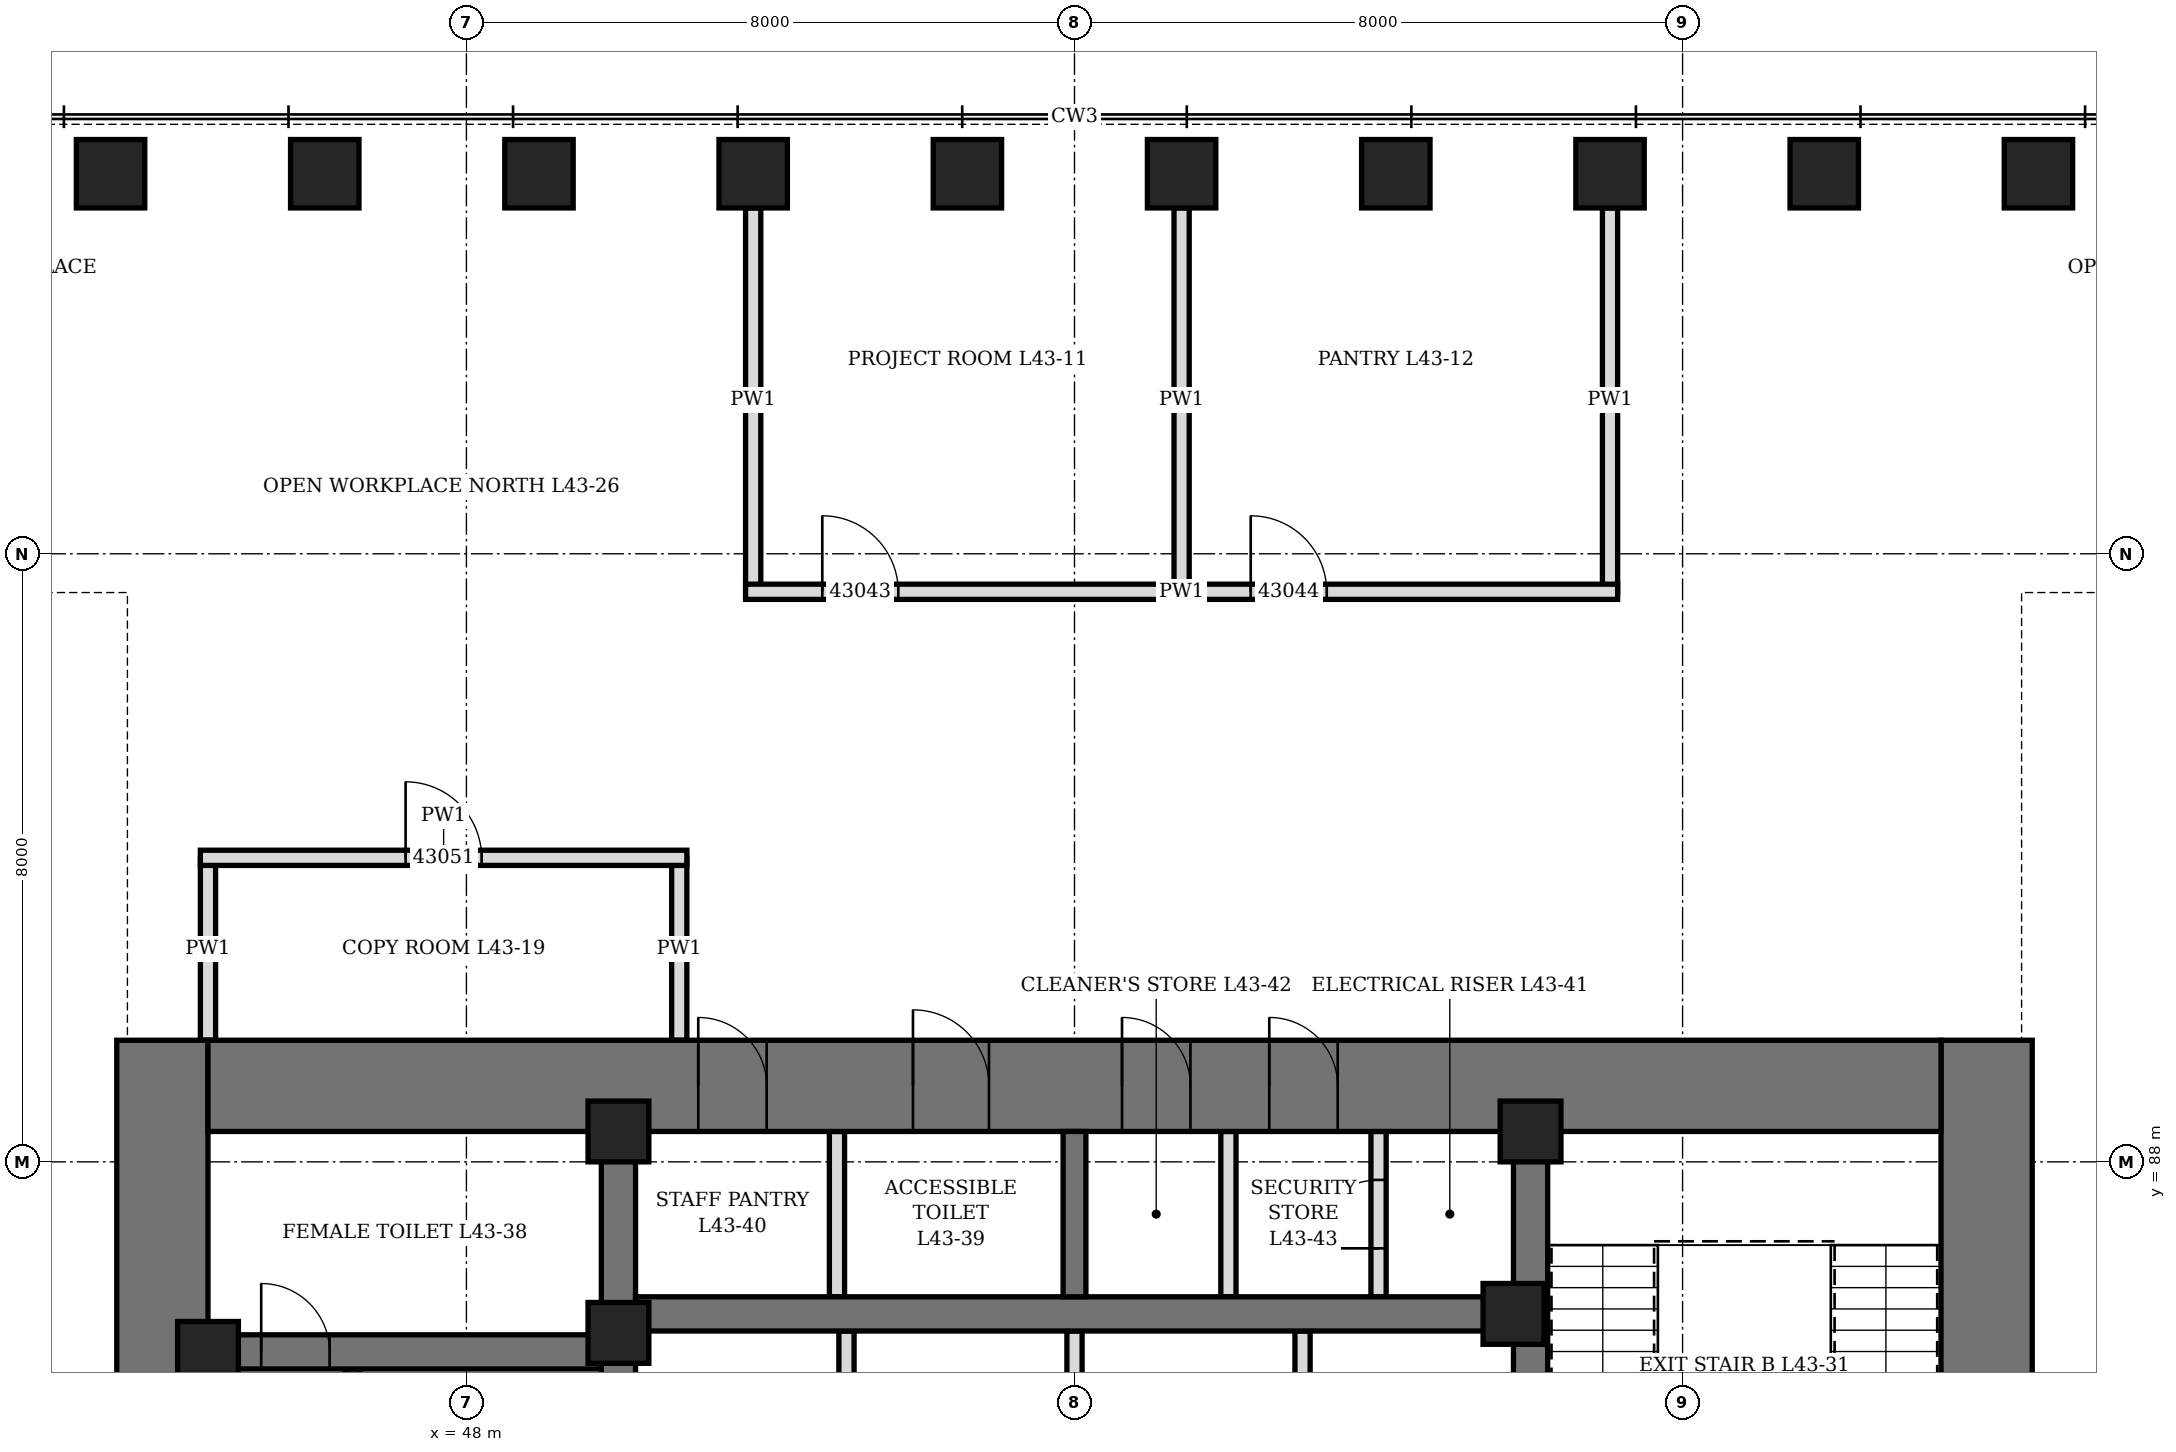
"""IFC4 building model, lengths in metres.
Left out: names, types, materials, properties, quantities, classifications, styles, units other than length and angle.
Written with IfcOpenShell. Run it as: python <this file> out.ifc"""

import sys

from ifc_helpers import new_model, si_unit, direction, frame, frame_2d, origin, origin_2d, place, context, subcontext, project, spatial, rectangle, hollow_rectangle, extrude, element, fill, save


model = new_model("IFC4")
c1 = context("Model", 3, precision=1e-05, world=origin(), true_north=direction((0.0, 1.0)))
c2 = subcontext(c1, "Body", "Model", "MODEL_VIEW")
j1 = project(units=[si_unit("LENGTHUNIT", "METRE"), si_unit("PLANEANGLEUNIT", "RADIAN")], contexts=[c1])
p1 = place(None, origin())
s1 = spatial("IfcSite", under=j1, at=p1, CompositionType="ELEMENT")
p2 = place(p1, origin())
s2 = spatial("IfcBuilding", under=s1, at=p2, CompositionType="ELEMENT")
p3 = place(p2, frame((0.0, 0.0, 193.9)))
s3 = spatial("IfcBuildingStorey", under=s2, at=p3, CompositionType="ELEMENT", Elevation=193.9)
for number, where, z_axis, x_axis in (
    (1, (68.682, 101.0, 0.0), (0.0, 0.0, 1.0), (1.0, 0.0, 0.0)),
    (2, (65.864, 101.0, 0.0), (0.0, 0.0, 1.0), (1.0, 0.0, 0.0)),
    (3, (63.045, 101.0, 0.0), (0.0, 0.0, 1.0), (1.0, 0.0, 0.0)),
    (4, (60.227, 101.0, 0.0), (0.0, 0.0, 1.0), (1.0, 0.0, 0.0)),
    (5, (57.409, 101.0, 0.0), (0.0, 0.0, 1.0), (1.0, 0.0, 0.0)),
    (6, (54.591, 101.0, 0.0), (0.0, 0.0, 1.0), (1.0, 0.0, 0.0)),
    (7, (51.773, 101.0, 0.0), (0.0, 0.0, 1.0), (1.0, 0.0, 0.0)),
    (8, (48.955, 101.0, 0.0), (0.0, 0.0, 1.0), (1.0, 0.0, 0.0)),
    (9, (46.136, 101.0, 0.0), (0.0, 0.0, 1.0), (1.0, 0.0, 0.0)),
    (10, (43.318, 101.0, 0.0), (0.0, 0.0, 1.0), (1.0, 0.0, 0.0)),
):
    element("IfcColumn", number, at=place(p3, frame(where, z_axis=z_axis, x_axis=x_axis)), inside=s3, PredefinedType="COLUMN", context=c2, shape_type="SweptSolid", body=[
        extrude(hollow_rectangle(XDim=0.9, YDim=0.9, WallThickness=0.12, at=origin_2d()), origin(), (0.0, 0.0, 1.0), 4.2),
    ])
p4 = place(p3, frame((44.0, 70.4, 0.0), z_axis=(0.0, 0.0, 1.0), x_axis=(0.0, 1.0, 0.0)))
e11 = element("IfcWall", 11, at=p4, inside=s3, PredefinedType="SHEAR", context=c2, shape_type="SweptSolid", body=[
    extrude(rectangle(XDim=19.2, YDim=1.2, at=frame_2d((9.6, 0.0))), origin(), (0.0, 0.0, 1.0), 4.2),
])
p5 = place(p4, frame((8.6, 0.0, 0.0)))
e12 = element("IfcOpeningElement", 12, at=p5, cuts=e11, PredefinedType="OPENING", context=c2, shape_type="SweptSolid", body=[
    extrude(rectangle(XDim=2.0, YDim=2.4, at=frame_2d((1.0, 1.2))), frame((0.0, 0.61, 0.0), z_axis=(0.0, -1.0, 0.0), x_axis=(1.0, 0.0, 0.0)), (0.0, 0.0, 1.0), 1.22),
])
p6 = place(p3, frame((68.0, 70.4, 0.0), z_axis=(0.0, 0.0, 1.0), x_axis=(0.0, 1.0, 0.0)))
e13 = element("IfcWall", 13, at=p6, inside=s3, PredefinedType="SHEAR", context=c2, shape_type="SweptSolid", body=[
    extrude(rectangle(XDim=19.2, YDim=1.2, at=frame_2d((9.6, 0.0))), origin(), (0.0, 0.0, 1.0), 4.2),
])
p7 = place(p6, frame((8.6, 0.0, 0.0)))
e14 = element("IfcOpeningElement", 14, at=p7, cuts=e13, PredefinedType="OPENING", context=c2, shape_type="SweptSolid", body=[
    extrude(rectangle(XDim=2.0, YDim=2.4, at=frame_2d((1.0, 1.2))), frame((0.0, 0.61, 0.0), z_axis=(0.0, -1.0, 0.0), x_axis=(1.0, 0.0, 0.0)), (0.0, 0.0, 1.0), 1.22),
])
p8 = place(p3, frame((44.6, 89.0, 0.0), z_axis=(0.0, 0.0, 1.0), x_axis=(1.0, 0.0, 0.0)))
e15 = element("IfcWall", 15, at=p8, inside=s3, PredefinedType="SHEAR", context=c2, shape_type="SweptSolid", body=[
    extrude(rectangle(XDim=22.8, YDim=1.2, at=frame_2d((11.4, 0.0))), origin(), (0.0, 0.0, 1.0), 4.2),
])
p9 = place(p8, frame((9.275, 0.0, 0.0)))
e16 = element("IfcOpeningElement", 16, at=p9, cuts=e15, PredefinedType="OPENING", context=c2, shape_type="SweptSolid", body=[
    extrude(rectangle(XDim=1.0, YDim=2.1, at=frame_2d((0.5, 1.05))), frame((0.0, 0.61, 0.0), z_axis=(0.0, -1.0, 0.0), x_axis=(1.0, 0.0, 0.0)), (0.0, 0.0, 1.0), 1.22),
])
p10 = place(p8, frame((6.45, 0.0, 0.0)))
e17 = element("IfcOpeningElement", 17, at=p10, cuts=e15, PredefinedType="OPENING", context=c2, shape_type="SweptSolid", body=[
    extrude(rectangle(XDim=0.9, YDim=2.1, at=frame_2d((0.45, 1.05))), frame((0.0, 0.61, 0.0), z_axis=(0.0, -1.0, 0.0), x_axis=(1.0, 0.0, 0.0)), (0.0, 0.0, 1.0), 1.22),
])
p11 = place(p8, frame((12.025, 0.0, 0.0)))
e18 = element("IfcOpeningElement", 18, at=p11, cuts=e15, PredefinedType="OPENING", context=c2, shape_type="SweptSolid", body=[
    extrude(rectangle(XDim=0.9, YDim=2.1, at=frame_2d((0.45, 1.05))), frame((0.0, 0.61, 0.0), z_axis=(0.0, -1.0, 0.0), x_axis=(1.0, 0.0, 0.0)), (0.0, 0.0, 1.0), 1.22),
])
p12 = place(p8, frame((13.962, 0.0, 0.0)))
e19 = element("IfcOpeningElement", 19, at=p12, cuts=e15, PredefinedType="OPENING", context=c2, shape_type="SweptSolid", body=[
    extrude(rectangle(XDim=0.9, YDim=2.1, at=frame_2d((0.45, 1.05))), frame((0.0, 0.61, 0.0), z_axis=(0.0, -1.0, 0.0), x_axis=(1.0, 0.0, 0.0)), (0.0, 0.0, 1.0), 1.22),
])
p13 = place(p3, frame((50.0, 71.6, 0.0), z_axis=(0.0, 0.0, 1.0), x_axis=(0.0, 1.0, 0.0)))
e20 = element("IfcWall", 20, at=p13, inside=s3, PredefinedType="SHEAR", context=c2, shape_type="SweptSolid", body=[
    extrude(rectangle(XDim=16.8, YDim=0.45, at=frame_2d((8.4, 0.0))), origin(), (0.0, 0.0, 1.0), 4.2),
])
p14 = place(p13, frame((7.5, 0.0, 0.0)))
e21 = element("IfcOpeningElement", 21, at=p14, cuts=e20, PredefinedType="OPENING", context=c2, shape_type="SweptSolid", body=[
    extrude(rectangle(XDim=1.8, YDim=2.4, at=frame_2d((0.9, 1.2))), frame((0.0, 0.235, 0.0), z_axis=(0.0, -1.0, 0.0), x_axis=(1.0, 0.0, 0.0)), (0.0, 0.0, 1.0), 0.47),
])
p15 = place(p3, frame((62.0, 71.6, 0.0), z_axis=(0.0, 0.0, 1.0), x_axis=(0.0, 1.0, 0.0)))
e22 = element("IfcWall", 22, at=p15, inside=s3, PredefinedType="SHEAR", context=c2, shape_type="SweptSolid", body=[
    extrude(rectangle(XDim=16.8, YDim=0.45, at=frame_2d((8.4, 0.0))), origin(), (0.0, 0.0, 1.0), 4.2),
])
p16 = place(p15, frame((7.5, 0.0, 0.0)))
e23 = element("IfcOpeningElement", 23, at=p16, cuts=e22, PredefinedType="OPENING", context=c2, shape_type="SweptSolid", body=[
    extrude(rectangle(XDim=1.8, YDim=2.4, at=frame_2d((0.9, 1.2))), frame((0.0, 0.235, 0.0), z_axis=(0.0, -1.0, 0.0), x_axis=(1.0, 0.0, 0.0)), (0.0, 0.0, 1.0), 0.47),
])
p17 = place(p3, frame((44.6, 85.5, 0.0), z_axis=(0.0, 0.0, 1.0), x_axis=(1.0, 0.0, 0.0)))
e24 = element("IfcWall", 24, at=p17, inside=s3, PredefinedType="SHEAR", context=c2, shape_type="SweptSolid", body=[
    extrude(rectangle(XDim=5.175, YDim=0.45, at=frame_2d((2.587, 0.0))), origin(), (0.0, 0.0, 1.0), 4.2),
])
p18 = place(p17, frame((0.7, 0.0, 0.0)))
e25 = element("IfcOpeningElement", 25, at=p18, cuts=e24, PredefinedType="OPENING", context=c2, shape_type="SweptSolid", body=[
    extrude(rectangle(XDim=0.9, YDim=2.1, at=frame_2d((0.45, 1.05))), frame((0.0, 0.235, 0.0), z_axis=(0.0, -1.0, 0.0), x_axis=(1.0, 0.0, 0.0)), (0.0, 0.0, 1.0), 0.47),
])
p19 = place(p3, frame((50.225, 86.0, 0.0), z_axis=(0.0, 0.0, 1.0), x_axis=(1.0, 0.0, 0.0)))
e26 = element("IfcWall", 26, at=p19, inside=s3, PredefinedType="SHEAR", context=c2, shape_type="SweptSolid", body=[
    extrude(rectangle(XDim=11.55, YDim=0.45, at=frame_2d((5.775, 0.0))), origin(), (0.0, 0.0, 1.0), 4.2),
])
p20 = place(p3, frame((56.0, 86.225, 0.0), z_axis=(0.0, 0.0, 1.0), x_axis=(0.0, 1.0, 0.0)))
e27 = element("IfcWall", 27, at=p20, inside=s3, PredefinedType="SHEAR", context=c2, shape_type="SweptSolid", body=[
    extrude(rectangle(XDim=2.175, YDim=0.3, at=frame_2d((1.087, 0.0))), origin(), (0.0, 0.0, 1.0), 4.2),
])
for number, where, z_axis, x_axis in (
    (28, (44.6, 85.5, 0.0), (0.0, 0.0, 1.0), (1.0, 0.0, 0.0)),
    (29, (50.0, 85.75, 0.0), (0.0, 0.0, 1.0), (1.0, 0.0, 0.0)),
    (30, (50.0, 88.4, 0.0), (0.0, 0.0, 1.0), (1.0, 0.0, 0.0)),
    (31, (61.775, 86.0, 0.0), (0.0, 0.0, 1.0), (1.0, 0.0, 0.0)),
    (32, (62.0, 88.4, 0.0), (0.0, 0.0, 1.0), (1.0, 0.0, 0.0)),
):
    element("IfcColumn", number, at=place(p3, frame(where, z_axis=z_axis, x_axis=x_axis)), inside=s3, PredefinedType="COLUMN", context=c2, shape_type="SweptSolid", body=[
        extrude(hollow_rectangle(XDim=0.8, YDim=0.8, WallThickness=0.1, at=origin_2d()), origin(), (0.0, 0.0, 1.0), 4.2),
    ])
p21 = place(p3, frame((46.5, 82.225, 0.0), z_axis=(0.0, 0.0, 1.0), x_axis=(0.0, 1.0, 0.0)))
e33 = element("IfcWall", 33, at=p21, inside=s3, PredefinedType="PARTITIONING", context=c2, shape_type="SweptSolid", body=[
    extrude(rectangle(XDim=3.05, YDim=0.2, at=frame_2d((1.525, 0.0))), origin(), (0.0, 0.0, 1.0), 4.04),
])
p22 = place(p21, frame((1.075, 0.0, 0.0)))
e34 = element("IfcOpeningElement", 34, at=p22, cuts=e33, PredefinedType="OPENING", context=c2, shape_type="SweptSolid", body=[
    extrude(rectangle(XDim=0.9, YDim=2.1, at=frame_2d((0.45, 1.05))), frame((0.0, 0.11, 0.0), z_axis=(0.0, -1.0, 0.0), x_axis=(1.0, 0.0, 0.0)), (0.0, 0.0, 1.0), 0.22),
])
p23 = place(p3, frame((52.875, 86.225, 0.0), z_axis=(0.0, 0.0, 1.0), x_axis=(0.0, 1.0, 0.0)))
e35 = element("IfcWall", 35, at=p23, inside=s3, PredefinedType="PARTITIONING", context=c2, shape_type="SweptSolid", body=[
    extrude(rectangle(XDim=2.175, YDim=0.2, at=frame_2d((1.087, 0.0))), origin(), (0.0, 0.0, 1.0), 4.04),
])
p24 = place(p3, frame((60.0, 86.225, 0.0), z_axis=(0.0, 0.0, 1.0), x_axis=(0.0, 1.0, 0.0)))
e36 = element("IfcWall", 36, at=p24, inside=s3, PredefinedType="PARTITIONING", context=c2, shape_type="SweptSolid", body=[
    extrude(rectangle(XDim=2.175, YDim=0.2, at=frame_2d((1.087, 0.0))), origin(), (0.0, 0.0, 1.0), 4.04),
])
p25 = place(p24, frame((0.637, 0.0, 0.0)))
e37 = element("IfcOpeningElement", 37, at=p25, cuts=e36, PredefinedType="OPENING", context=c2, shape_type="SweptSolid", body=[
    extrude(rectangle(XDim=0.9, YDim=2.1, at=frame_2d((0.45, 1.05))), frame((0.0, 0.11, 0.0), z_axis=(0.0, -1.0, 0.0), x_axis=(1.0, 0.0, 0.0)), (0.0, 0.0, 1.0), 0.22),
])
p26 = place(p3, frame((58.025, 86.225, 0.0), z_axis=(0.0, 0.0, 1.0), x_axis=(0.0, 1.0, 0.0)))
e38 = element("IfcWall", 38, at=p26, inside=s3, PredefinedType="PARTITIONING", context=c2, shape_type="SweptSolid", body=[
    extrude(rectangle(XDim=2.175, YDim=0.2, at=frame_2d((1.087, 0.0))), origin(), (0.0, 0.0, 1.0), 4.04),
])
p27 = place(p3, frame((53.0, 82.225, 0.0), z_axis=(0.0, 0.0, 1.0), x_axis=(0.0, 1.0, 0.0)))
e39 = element("IfcWall", 39, at=p27, inside=s3, PredefinedType="PARTITIONING", context=c2, shape_type="SweptSolid", body=[
    extrude(rectangle(XDim=3.55, YDim=0.2, at=frame_2d((1.775, 0.0))), origin(), (0.0, 0.0, 1.0), 4.04),
])
p28 = place(p3, frame((56.0, 82.225, 0.0), z_axis=(0.0, 0.0, 1.0), x_axis=(0.0, 1.0, 0.0)))
e40 = element("IfcWall", 40, at=p28, inside=s3, PredefinedType="PARTITIONING", context=c2, shape_type="SweptSolid", body=[
    extrude(rectangle(XDim=3.55, YDim=0.2, at=frame_2d((1.775, 0.0))), origin(), (0.0, 0.0, 1.0), 3.14),
])
p29 = place(p3, frame((59.0, 82.225, 0.0), z_axis=(0.0, 0.0, 1.0), x_axis=(0.0, 1.0, 0.0)))
e41 = element("IfcWall", 41, at=p29, inside=s3, PredefinedType="PARTITIONING", context=c2, shape_type="SweptSolid", body=[
    extrude(rectangle(XDim=3.55, YDim=0.2, at=frame_2d((1.775, 0.0))), origin(), (0.0, 0.0, 1.0), 4.04),
])
for number, where, z_axis, x_axis in (
    (42, (51.773, 95.5, 0.0), (0.0, 0.0, 1.0), (0.0, 1.0, 0.0)),
    (43, (57.409, 95.5, 0.0), (0.0, 0.0, 1.0), (0.0, 1.0, 0.0)),
    (44, (63.045, 95.5, 0.0), (0.0, 0.0, 1.0), (0.0, 1.0, 0.0)),
):
    element("IfcWall", number, at=place(p3, frame(where, z_axis=z_axis, x_axis=x_axis)), inside=s3, PredefinedType="PARTITIONING", context=c2, shape_type="SweptSolid", body=[
        extrude(rectangle(XDim=5.05, YDim=0.2, at=frame_2d((2.525, 0.0))), origin(), (0.0, 0.0, 1.0), 3.428),
    ])
for number, where, z_axis, x_axis in (
    (45, (44.6, 89.6, 0.0), (0.0, 0.0, 1.0), (0.0, 1.0, 0.0)),
    (46, (50.8, 89.6, 0.0), (0.0, 0.0, 1.0), (0.0, 1.0, 0.0)),
):
    element("IfcWall", number, at=place(p3, frame(where, z_axis=z_axis, x_axis=x_axis)), inside=s3, PredefinedType="PARTITIONING", context=c2, shape_type="SweptSolid", body=[
        extrude(rectangle(XDim=2.4, YDim=0.2, at=frame_2d((1.2, 0.0))), origin(), (0.0, 0.0, 1.0), 4.04),
    ])
p30 = place(p3, frame((44.5, 92.0, 0.0), z_axis=(0.0, 0.0, 1.0), x_axis=(1.0, 0.0, 0.0)))
e47 = element("IfcWall", 47, at=p30, inside=s3, PredefinedType="PARTITIONING", context=c2, shape_type="SweptSolid", body=[
    extrude(rectangle(XDim=6.4, YDim=0.2, at=frame_2d((3.2, 0.0))), origin(), (0.0, 0.0, 1.0), 4.04),
])
p31 = place(p30, frame((2.7, 0.0, 0.0)))
e48 = element("IfcOpeningElement", 48, at=p31, cuts=e47, PredefinedType="OPENING", context=c2, shape_type="SweptSolid", body=[
    extrude(rectangle(XDim=1.0, YDim=2.1, at=frame_2d((0.5, 1.05))), frame((0.0, 0.11, 0.0), z_axis=(0.0, -1.0, 0.0), x_axis=(1.0, 0.0, 0.0)), (0.0, 0.0, 1.0), 0.22),
])
p32 = place(p3, frame((51.673, 95.5, 0.0), z_axis=(0.0, 0.0, 1.0), x_axis=(1.0, 0.0, 0.0)))
e49 = element("IfcWall", 49, at=p32, inside=s3, PredefinedType="PARTITIONING", context=c2, shape_type="SweptSolid", body=[
    extrude(rectangle(XDim=11.473, YDim=0.2, at=frame_2d((5.736, 0.0))), origin(), (0.0, 0.0, 1.0), 4.04),
])
p33 = place(p32, frame((1.009, 0.0, 0.0)))
e50 = element("IfcOpeningElement", 50, at=p33, cuts=e49, PredefinedType="OPENING", context=c2, shape_type="SweptSolid", body=[
    extrude(rectangle(XDim=1.0, YDim=2.1, at=frame_2d((0.5, 1.05))), frame((0.0, 0.11, 0.0), z_axis=(0.0, -1.0, 0.0), x_axis=(1.0, 0.0, 0.0)), (0.0, 0.0, 1.0), 0.22),
])
p34 = place(p32, frame((6.646, 0.0, 0.0)))
e51 = element("IfcOpeningElement", 51, at=p34, cuts=e49, PredefinedType="OPENING", context=c2, shape_type="SweptSolid", body=[
    extrude(rectangle(XDim=1.0, YDim=2.1, at=frame_2d((0.5, 1.05))), frame((0.0, 0.11, 0.0), z_axis=(0.0, -1.0, 0.0), x_axis=(1.0, 0.0, 0.0)), (0.0, 0.0, 1.0), 0.22),
])
p35 = place(p18, origin())
e52 = element("IfcDoor", 52, at=p35, inside=s3, OperationType="SINGLE_SWING_RIGHT", PredefinedType="DOOR", context=c2, shape_type="SweptSolid", body=[
    extrude(rectangle(XDim=0.9, YDim=2.1, at=frame_2d((0.45, 1.05))), frame((0.0, 0.225, 0.0), z_axis=(0.0, -1.0, 0.0), x_axis=(1.0, 0.0, 0.0)), (0.0, 0.0, 1.0), 0.449),
])
fill(e25, e52)
p36 = place(p9, origin())
e53 = element("IfcDoor", 53, at=p36, inside=s3, OperationType="SINGLE_SWING_LEFT", PredefinedType="DOOR", context=c2, shape_type="SweptSolid", body=[
    extrude(rectangle(XDim=1.0, YDim=2.1, at=frame_2d((0.5, 1.05))), frame((0.0, 0.35, 0.0), z_axis=(0.0, -1.0, 0.0), x_axis=(1.0, 0.0, 0.0)), (0.0, 0.0, 1.0), 0.7),
])
fill(e16, e53)
p37 = place(p10, origin())
e54 = element("IfcDoor", 54, at=p37, inside=s3, OperationType="SINGLE_SWING_LEFT", PredefinedType="DOOR", context=c2, shape_type="SweptSolid", body=[
    extrude(rectangle(XDim=0.9, YDim=2.1, at=frame_2d((0.45, 1.05))), frame((0.0, 0.35, 0.0), z_axis=(0.0, -1.0, 0.0), x_axis=(1.0, 0.0, 0.0)), (0.0, 0.0, 1.0), 0.7),
])
fill(e17, e54)
p38 = place(p11, origin())
e55 = element("IfcDoor", 55, at=p38, inside=s3, OperationType="SINGLE_SWING_LEFT", PredefinedType="DOOR", context=c2, shape_type="SweptSolid", body=[
    extrude(rectangle(XDim=0.9, YDim=2.1, at=frame_2d((0.45, 1.05))), frame((0.0, 0.35, 0.0), z_axis=(0.0, -1.0, 0.0), x_axis=(1.0, 0.0, 0.0)), (0.0, 0.0, 1.0), 0.7),
])
fill(e18, e55)
p39 = place(p12, origin())
e56 = element("IfcDoor", 56, at=p39, inside=s3, OperationType="SINGLE_SWING_LEFT", PredefinedType="DOOR", context=c2, shape_type="SweptSolid", body=[
    extrude(rectangle(XDim=0.9, YDim=2.1, at=frame_2d((0.45, 1.05))), frame((0.0, 0.35, 0.0), z_axis=(0.0, -1.0, 0.0), x_axis=(1.0, 0.0, 0.0)), (0.0, 0.0, 1.0), 0.7),
])
fill(e19, e56)
p40 = place(p25, origin())
e57 = element("IfcDoor", 57, at=p40, inside=s3, OperationType="SINGLE_SWING_LEFT", PredefinedType="DOOR", context=c2, shape_type="SweptSolid", body=[
    extrude(rectangle(XDim=0.9, YDim=2.1, at=frame_2d((0.45, 1.05))), frame((0.0, 0.1, 0.0), z_axis=(0.0, -1.0, 0.0), x_axis=(1.0, 0.0, 0.0)), (0.0, 0.0, 1.0), 0.199),
])
fill(e37, e57)
p41 = place(p33, origin())
e58 = element("IfcDoor", 58, at=p41, inside=s3, OperationType="SINGLE_SWING_LEFT", PredefinedType="DOOR", context=c2, shape_type="SweptSolid", body=[
    extrude(rectangle(XDim=1.0, YDim=2.1, at=frame_2d((0.5, 1.05))), frame((0.0, 0.1, 0.0), z_axis=(0.0, -1.0, 0.0), x_axis=(1.0, 0.0, 0.0)), (0.0, 0.0, 1.0), 0.199),
])
fill(e50, e58)
p42 = place(p34, origin())
e59 = element("IfcDoor", 59, at=p42, inside=s3, OperationType="SINGLE_SWING_LEFT", PredefinedType="DOOR", context=c2, shape_type="SweptSolid", body=[
    extrude(rectangle(XDim=1.0, YDim=2.1, at=frame_2d((0.5, 1.05))), frame((0.0, 0.1, 0.0), z_axis=(0.0, -1.0, 0.0), x_axis=(1.0, 0.0, 0.0)), (0.0, 0.0, 1.0), 0.199),
])
fill(e51, e59)
p43 = place(p31, origin())
e60 = element("IfcDoor", 60, at=p43, inside=s3, OperationType="SINGLE_SWING_LEFT", PredefinedType="DOOR", context=c2, shape_type="SweptSolid", body=[
    extrude(rectangle(XDim=1.0, YDim=2.1, at=frame_2d((0.5, 1.05))), frame((0.0, 0.1, 0.0), z_axis=(0.0, -1.0, 0.0), x_axis=(1.0, 0.0, 0.0)), (0.0, 0.0, 1.0), 0.199),
])
fill(e48, e60)
save(model, sys.argv[1])
